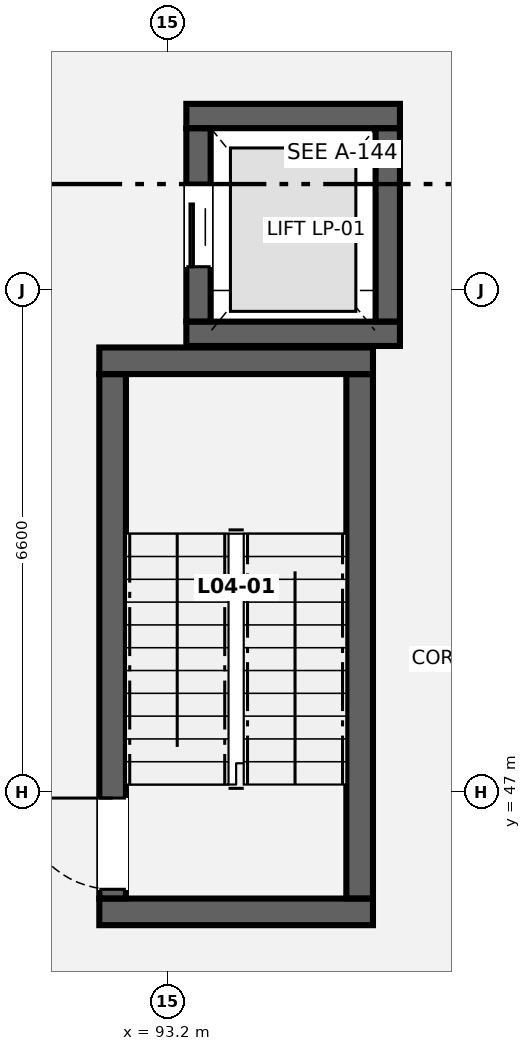
"""IFC4 building model, lengths in metres.
Left out: names, types, materials, properties, quantities, classifications, styles, units other than length and angle.
Written with IfcOpenShell. Run it as: python <this file> out.ifc"""

import sys

from ifc_helpers import new_model, si_unit, direction, frame, frame_2d, origin, place, context, subcontext, project, spatial, rectangle, extrude, element, fill, save


model = new_model("IFC4")
c1 = context("Model", 3, precision=1e-05, world=origin(), true_north=direction((0.0, 1.0)))
c2 = subcontext(c1, "Body", "Model", "MODEL_VIEW")
j1 = project(units=[si_unit("LENGTHUNIT", "METRE"), si_unit("PLANEANGLEUNIT", "RADIAN")], contexts=[c1])
p1 = place(None, origin())
s1 = spatial("IfcSite", under=j1, at=p1, CompositionType="ELEMENT")
p2 = place(p1, origin())
s2 = spatial("IfcBuilding", under=s1, at=p2, CompositionType="ELEMENT")
p3 = place(p2, frame((0.0, 0.0, 17.5)))
s3 = spatial("IfcBuildingStorey", under=s2, at=p3, CompositionType="ELEMENT", Elevation=17.5)
for number, where, z_axis, x_axis in (
    (1, (92.3, 45.425, 0.0), (0.0, 0.0, 1.0), (1.0, 0.0, 0.0)),
    (2, (92.3, 52.675, 0.0), (0.0, 0.0, 1.0), (1.0, 0.0, 0.0)),
):
    element("IfcWall", number, at=place(p3, frame(where, z_axis=z_axis, x_axis=x_axis)), inside=s3, PredefinedType="SHEAR", context=c2, shape_type="SweptSolid", body=[
        extrude(rectangle(XDim=3.6, YDim=0.35, at=frame_2d((1.8, 0.0))), origin(), (0.0, 0.0, 1.0), 4.0),
    ])
p4 = place(p3, frame((92.475, 45.602, 0.0), z_axis=(0.0, 0.0, 1.0), x_axis=(0.0, 1.0, 0.0)))
e3 = element("IfcWall", 3, at=p4, inside=s3, PredefinedType="SHEAR", context=c2, shape_type="SweptSolid", body=[
    extrude(rectangle(XDim=6.896, YDim=0.35, at=frame_2d((3.448, 0.0))), origin(), (0.0, 0.0, 1.0), 4.0),
])
p5 = place(p4, frame((0.12, 0.0, 0.0)))
e4 = element("IfcOpeningElement", 4, at=p5, cuts=e3, PredefinedType="OPENING", context=c2, shape_type="SweptSolid", body=[
    extrude(rectangle(XDim=1.2, YDim=2.15, at=frame_2d((0.6, 1.075))), frame((0.0, 0.185, 0.0), z_axis=(0.0, -1.0, 0.0), x_axis=(1.0, 0.0, 0.0)), (0.0, 0.0, 1.0), 0.37),
])
p6 = place(p3, frame((95.725, 45.602, 0.0), z_axis=(0.0, 0.0, 1.0), x_axis=(0.0, 1.0, 0.0)))
e5 = element("IfcWall", 5, at=p6, inside=s3, PredefinedType="SHEAR", context=c2, shape_type="SweptSolid", body=[
    extrude(rectangle(XDim=6.896, YDim=0.35, at=frame_2d((3.448, 0.0))), origin(), (0.0, 0.0, 1.0), 4.0),
])
for number, where, z_axis, x_axis in (
    (6, (93.445, 53.03, 0.0), (0.0, 0.0, 1.0), (1.0, 0.0, 0.0)),
    (7, (93.445, 55.895, 0.0), (0.0, 0.0, 1.0), (1.0, 0.0, 0.0)),
):
    element("IfcWall", number, at=place(p3, frame(where, z_axis=z_axis, x_axis=x_axis)), inside=s3, PredefinedType="SHEAR", context=c2, shape_type="SweptSolid", body=[
        extrude(rectangle(XDim=2.81, YDim=0.32, at=frame_2d((1.405, 0.0))), origin(), (0.0, 0.0, 1.0), 4.0),
    ])
p7 = place(p3, frame((93.605, 53.192, 0.0), z_axis=(0.0, 0.0, 1.0), x_axis=(0.0, 1.0, 0.0)))
e8 = element("IfcWall", 8, at=p7, inside=s3, PredefinedType="SHEAR", context=c2, shape_type="SweptSolid", body=[
    extrude(rectangle(XDim=2.541, YDim=0.32, at=frame_2d((1.271, 0.0))), origin(), (0.0, 0.0, 1.0), 4.0),
])
p8 = place(p7, frame((0.72, 0.0, 0.0)))
e9 = element("IfcOpeningElement", 9, at=p8, cuts=e8, PredefinedType="OPENING", context=c2, shape_type="SweptSolid", body=[
    extrude(rectangle(XDim=1.1, YDim=2.15, at=frame_2d((0.55, 1.075))), frame((0.0, 0.17, 0.0), z_axis=(0.0, -1.0, 0.0), x_axis=(1.0, 0.0, 0.0)), (0.0, 0.0, 1.0), 0.34),
])
p9 = place(p3, frame((96.095, 53.192, 0.0), z_axis=(0.0, 0.0, 1.0), x_axis=(0.0, 1.0, 0.0)))
e10 = element("IfcWall", 10, at=p9, inside=s3, PredefinedType="SHEAR", context=c2, shape_type="SweptSolid", body=[
    extrude(rectangle(XDim=2.541, YDim=0.32, at=frame_2d((1.271, 0.0))), origin(), (0.0, 0.0, 1.0), 4.0),
])
p10 = place(p5, origin())
e11 = element("IfcDoor", 11, at=p10, inside=s3, OperationType="SINGLE_SWING_RIGHT", PredefinedType="DOOR", context=c2, shape_type="SweptSolid", body=[
    extrude(rectangle(XDim=1.2, YDim=2.15, at=frame_2d((0.6, 1.075))), frame((0.0, 0.025, 0.0), z_axis=(0.0, -1.0, 0.0), x_axis=(1.0, 0.0, 0.0)), (0.0, 0.0, 1.0), 0.05),
])
fill(e4, e11)
p11 = place(p8, origin())
e12 = element("IfcDoor", 12, at=p11, inside=s3, OperationType="SLIDING_TO_LEFT", PredefinedType="DOOR", context=c2, shape_type="SweptSolid", body=[
    extrude(rectangle(XDim=1.1, YDim=2.15, at=frame_2d((0.55, 1.075))), frame((0.0, 0.025, 0.0), z_axis=(0.0, -1.0, 0.0), x_axis=(1.0, 0.0, 0.0)), (0.0, 0.0, 1.0), 0.05),
])
fill(e9, e12)
save(model, sys.argv[1])
